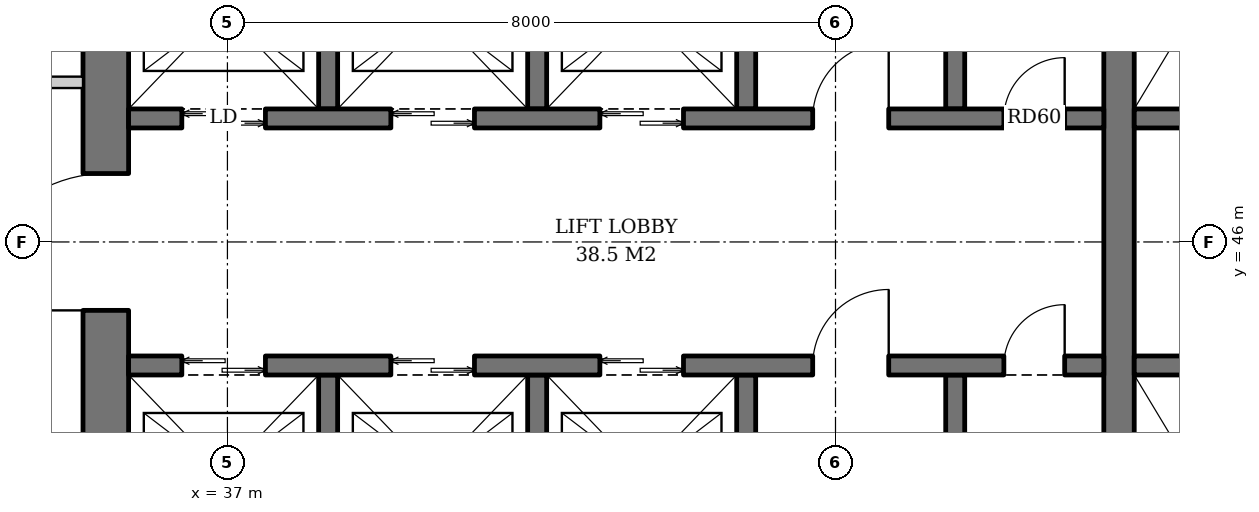
"""IFC4 building model, lengths in metres.
Left out: names, types, materials, properties, quantities, classifications, styles, units other than length and angle.
Written with IfcOpenShell. Run it as: python <this file> out.ifc"""

import sys

from ifc_helpers import new_model, si_unit, direction, frame, frame_2d, origin, place, context, subcontext, project, spatial, rectangle, extrude, element, fill, save


model = new_model("IFC4")
c1 = context("Model", 3, precision=1e-05, world=origin(), true_north=direction((0.0, 1.0)))
c2 = subcontext(c1, "Body", "Model", "MODEL_VIEW")
j1 = project(units=[si_unit("LENGTHUNIT", "METRE"), si_unit("PLANEANGLEUNIT", "RADIAN")], contexts=[c1])
p1 = place(None, origin())
s1 = spatial("IfcSite", under=j1, at=p1, CompositionType="ELEMENT")
p2 = place(p1, origin())
s2 = spatial("IfcBuilding", under=s1, at=p2, CompositionType="ELEMENT")
p3 = place(p2, frame((0.0, 0.0, 173.0)))
s3 = spatial("IfcBuildingStorey", under=s2, at=p3, CompositionType="ELEMENT", Elevation=173.0)
p4 = place(p3, frame((35.4, 36.7, 0.0), z_axis=(0.0, 0.0, 1.0), x_axis=(0.0, 1.0, 0.0)))
e1 = element("IfcWall", 1, at=p4, inside=s3, PredefinedType="SHEAR", context=c2, shape_type="SweptSolid", body=[
    extrude(rectangle(XDim=18.6, YDim=0.6, at=frame_2d((9.3, 0.0))), origin(), (0.0, 0.0, 1.0), 3.8),
])
p5 = place(p4, frame((8.4, 0.0, 0.0)))
e2 = element("IfcOpeningElement", 2, at=p5, cuts=e1, PredefinedType="OPENING", context=c2, shape_type="SweptSolid", body=[
    extrude(rectangle(XDim=1.8, YDim=2.4, at=frame_2d((0.9, 1.2))), frame((0.0, 0.31, 0.0), z_axis=(0.0, -1.0, 0.0), x_axis=(1.0, 0.0, 0.0)), (0.0, 0.0, 1.0), 0.62),
])
p6 = place(p3, frame((48.73, 40.0, 0.0), z_axis=(0.0, 0.0, 1.0), x_axis=(0.0, 1.0, 0.0)))
e3 = element("IfcWall", 3, at=p6, inside=s3, PredefinedType="SHEAR", context=c2, shape_type="SweptSolid", body=[
    extrude(rectangle(XDim=12.0, YDim=0.4, at=frame_2d((6.0, 0.0))), origin(), (0.0, 0.0, 1.0), 3.8),
])
for number, where, z_axis, x_axis in (
    (4, (38.325, 47.75, 0.0), (0.0, 0.0, 1.0), (0.0, 1.0, 0.0)),
    (5, (41.075, 47.75, 0.0), (0.0, 0.0, 1.0), (0.0, 1.0, 0.0)),
    (6, (43.825, 47.75, 0.0), (0.0, 0.0, 1.0), (0.0, 1.0, 0.0)),
    (7, (46.575, 47.75, 0.0), (0.0, 0.0, 1.0), (0.0, 1.0, 0.0)),
):
    element("IfcWall", number, at=place(p3, frame(where, z_axis=z_axis, x_axis=x_axis)), inside=s3, PredefinedType="SHEAR", context=c2, shape_type="SweptSolid", body=[
        extrude(rectangle(XDim=2.6, YDim=0.25, at=frame_2d((1.3, 0.0))), origin(), (0.0, 0.0, 1.0), 3.8),
    ])
p7 = place(p3, frame((35.7, 47.625, 0.0), z_axis=(0.0, 0.0, 1.0), x_axis=(1.0, 0.0, 0.0)))
e8 = element("IfcWall", 8, at=p7, inside=s3, PredefinedType="SHEAR", context=c2, shape_type="SweptSolid", body=[
    extrude(rectangle(XDim=12.83, YDim=0.25, at=frame_2d((6.415, 0.0))), origin(), (0.0, 0.0, 1.0), 3.8),
])
p8 = place(p7, frame((0.7, 0.0, 0.0)))
e9 = element("IfcOpeningElement", 9, at=p8, cuts=e8, PredefinedType="OPENING", context=c2, shape_type="SweptSolid", body=[
    extrude(rectangle(XDim=1.1, YDim=2.2, at=frame_2d((0.55, 1.1))), frame((0.0, 0.135, 0.0), z_axis=(0.0, -1.0, 0.0), x_axis=(1.0, 0.0, 0.0)), (0.0, 0.0, 1.0), 0.27),
])
p9 = place(p7, frame((3.45, 0.0, 0.0)))
e10 = element("IfcOpeningElement", 10, at=p9, cuts=e8, PredefinedType="OPENING", context=c2, shape_type="SweptSolid", body=[
    extrude(rectangle(XDim=1.1, YDim=2.2, at=frame_2d((0.55, 1.1))), frame((0.0, 0.135, 0.0), z_axis=(0.0, -1.0, 0.0), x_axis=(1.0, 0.0, 0.0)), (0.0, 0.0, 1.0), 0.27),
])
p10 = place(p7, frame((6.2, 0.0, 0.0)))
e11 = element("IfcOpeningElement", 11, at=p10, cuts=e8, PredefinedType="OPENING", context=c2, shape_type="SweptSolid", body=[
    extrude(rectangle(XDim=1.1, YDim=2.2, at=frame_2d((0.55, 1.1))), frame((0.0, 0.135, 0.0), z_axis=(0.0, -1.0, 0.0), x_axis=(1.0, 0.0, 0.0)), (0.0, 0.0, 1.0), 0.27),
])
p11 = place(p7, frame((9.0, 0.0, 0.0)))
e12 = element("IfcOpeningElement", 12, at=p11, cuts=e8, PredefinedType="OPENING", context=c2, shape_type="SweptSolid", body=[
    extrude(rectangle(XDim=1.0, YDim=2.1, at=frame_2d((0.5, 1.05))), frame((0.0, 0.135, 0.0), z_axis=(0.0, -1.0, 0.0), x_axis=(1.0, 0.0, 0.0)), (0.0, 0.0, 1.0), 0.27),
])
p12 = place(p7, frame((11.515, 0.0, 0.0)))
e13 = element("IfcOpeningElement", 13, at=p12, cuts=e8, PredefinedType="OPENING", context=c2, shape_type="SweptSolid", body=[
    extrude(rectangle(XDim=0.8, YDim=2.0, at=frame_2d((0.4, 1.0))), frame((0.0, 0.135, 0.0), z_axis=(0.0, -1.0, 0.0), x_axis=(1.0, 0.0, 0.0)), (0.0, 0.0, 1.0), 0.27),
])
for number, where, z_axis, x_axis in (
    (14, (38.325, 44.25, 0.0), (0.0, 0.0, 1.0), (0.0, -1.0, 0.0)),
    (15, (41.075, 44.25, 0.0), (0.0, 0.0, 1.0), (0.0, -1.0, 0.0)),
    (16, (43.825, 44.25, 0.0), (0.0, 0.0, 1.0), (0.0, -1.0, 0.0)),
    (17, (46.575, 44.25, 0.0), (0.0, 0.0, 1.0), (0.0, -1.0, 0.0)),
):
    element("IfcWall", number, at=place(p3, frame(where, z_axis=z_axis, x_axis=x_axis)), inside=s3, PredefinedType="SHEAR", context=c2, shape_type="SweptSolid", body=[
        extrude(rectangle(XDim=2.6, YDim=0.25, at=frame_2d((1.3, 0.0))), origin(), (0.0, 0.0, 1.0), 3.8),
    ])
p13 = place(p3, frame((35.7, 44.375, 0.0), z_axis=(0.0, 0.0, 1.0), x_axis=(1.0, 0.0, 0.0)))
e18 = element("IfcWall", 18, at=p13, inside=s3, PredefinedType="SHEAR", context=c2, shape_type="SweptSolid", body=[
    extrude(rectangle(XDim=12.83, YDim=0.25, at=frame_2d((6.415, 0.0))), origin(), (0.0, 0.0, 1.0), 3.8),
])
p14 = place(p13, frame((0.7, 0.0, 0.0)))
e19 = element("IfcOpeningElement", 19, at=p14, cuts=e18, PredefinedType="OPENING", context=c2, shape_type="SweptSolid", body=[
    extrude(rectangle(XDim=1.1, YDim=2.2, at=frame_2d((0.55, 1.1))), frame((0.0, 0.135, 0.0), z_axis=(0.0, -1.0, 0.0), x_axis=(1.0, 0.0, 0.0)), (0.0, 0.0, 1.0), 0.27),
])
p15 = place(p13, frame((3.45, 0.0, 0.0)))
e20 = element("IfcOpeningElement", 20, at=p15, cuts=e18, PredefinedType="OPENING", context=c2, shape_type="SweptSolid", body=[
    extrude(rectangle(XDim=1.1, YDim=2.2, at=frame_2d((0.55, 1.1))), frame((0.0, 0.135, 0.0), z_axis=(0.0, -1.0, 0.0), x_axis=(1.0, 0.0, 0.0)), (0.0, 0.0, 1.0), 0.27),
])
p16 = place(p13, frame((6.2, 0.0, 0.0)))
e21 = element("IfcOpeningElement", 21, at=p16, cuts=e18, PredefinedType="OPENING", context=c2, shape_type="SweptSolid", body=[
    extrude(rectangle(XDim=1.1, YDim=2.2, at=frame_2d((0.55, 1.1))), frame((0.0, 0.135, 0.0), z_axis=(0.0, -1.0, 0.0), x_axis=(1.0, 0.0, 0.0)), (0.0, 0.0, 1.0), 0.27),
])
p17 = place(p13, frame((9.0, 0.0, 0.0)))
e22 = element("IfcOpeningElement", 22, at=p17, cuts=e18, PredefinedType="OPENING", context=c2, shape_type="SweptSolid", body=[
    extrude(rectangle(XDim=1.0, YDim=2.1, at=frame_2d((0.5, 1.05))), frame((0.0, 0.135, 0.0), z_axis=(0.0, -1.0, 0.0), x_axis=(1.0, 0.0, 0.0)), (0.0, 0.0, 1.0), 0.27),
])
p18 = place(p13, frame((11.515, 0.0, 0.0)))
e23 = element("IfcOpeningElement", 23, at=p18, cuts=e18, PredefinedType="OPENING", context=c2, shape_type="SweptSolid", body=[
    extrude(rectangle(XDim=0.8, YDim=2.0, at=frame_2d((0.4, 1.0))), frame((0.0, 0.135, 0.0), z_axis=(0.0, -1.0, 0.0), x_axis=(1.0, 0.0, 0.0)), (0.0, 0.0, 1.0), 0.27),
])
for number, where, z_axis, x_axis in (
    (24, (48.93, 47.625, 0.0), (0.0, 0.0, 1.0), (1.0, 0.0, 0.0)),
    (25, (48.93, 44.375, 0.0), (0.0, 0.0, 1.0), (1.0, 0.0, 0.0)),
):
    element("IfcWall", number, at=place(p3, frame(where, z_axis=z_axis, x_axis=x_axis)), inside=s3, PredefinedType="SHEAR", context=c2, shape_type="SweptSolid", body=[
        extrude(rectangle(XDim=5.37, YDim=0.25, at=frame_2d((2.685, 0.0))), origin(), (0.0, 0.0, 1.0), 3.8),
    ])
p19 = place(p3, frame((35.1, 48.1, 0.0), z_axis=(0.0, 0.0, 1.0), x_axis=(-1.0, 0.0, 0.0)))
e26 = element("IfcWall", 26, at=p19, inside=s3, PredefinedType="PARTITIONING", context=c2, shape_type="SweptSolid", body=[
    extrude(rectangle(XDim=2.325, YDim=0.15, at=frame_2d((1.163, 0.0))), origin(), (0.0, 0.0, 1.0), 3.62),
])
p20 = place(p8, origin())
e27 = element("IfcDoor", 27, at=p20, inside=s3, OperationType="DOUBLE_DOOR_SLIDING", PredefinedType="DOOR", context=c2, shape_type="SweptSolid", body=[
    extrude(rectangle(XDim=1.1, YDim=2.2, at=frame_2d((0.55, 1.1))), frame((0.0, 0.025, 0.0), z_axis=(0.0, -1.0, 0.0), x_axis=(1.0, 0.0, 0.0)), (0.0, 0.0, 1.0), 0.05),
])
fill(e9, e27)
p21 = place(p9, origin())
e28 = element("IfcDoor", 28, at=p21, inside=s3, OperationType="DOUBLE_DOOR_SLIDING", PredefinedType="DOOR", context=c2, shape_type="SweptSolid", body=[
    extrude(rectangle(XDim=1.1, YDim=2.2, at=frame_2d((0.55, 1.1))), frame((0.0, 0.025, 0.0), z_axis=(0.0, -1.0, 0.0), x_axis=(1.0, 0.0, 0.0)), (0.0, 0.0, 1.0), 0.05),
])
fill(e10, e28)
p22 = place(p10, origin())
e29 = element("IfcDoor", 29, at=p22, inside=s3, OperationType="DOUBLE_DOOR_SLIDING", PredefinedType="DOOR", context=c2, shape_type="SweptSolid", body=[
    extrude(rectangle(XDim=1.1, YDim=2.2, at=frame_2d((0.55, 1.1))), frame((0.0, 0.025, 0.0), z_axis=(0.0, -1.0, 0.0), x_axis=(1.0, 0.0, 0.0)), (0.0, 0.0, 1.0), 0.05),
])
fill(e11, e29)
p23 = place(p11, origin())
e30 = element("IfcDoor", 30, at=p23, inside=s3, OperationType="SINGLE_SWING_RIGHT", PredefinedType="DOOR", context=c2, shape_type="SweptSolid", body=[
    extrude(rectangle(XDim=1.0, YDim=2.1, at=frame_2d((0.5, 1.05))), frame((0.0, 0.025, 0.0), z_axis=(0.0, -1.0, 0.0), x_axis=(1.0, 0.0, 0.0)), (0.0, 0.0, 1.0), 0.05),
])
fill(e12, e30)
p24 = place(p12, origin())
e31 = element("IfcDoor", 31, at=p24, inside=s3, OperationType="SINGLE_SWING_RIGHT", PredefinedType="DOOR", context=c2, shape_type="SweptSolid", body=[
    extrude(rectangle(XDim=0.8, YDim=2.0, at=frame_2d((0.4, 1.0))), frame((0.0, 0.025, 0.0), z_axis=(0.0, -1.0, 0.0), x_axis=(1.0, 0.0, 0.0)), (0.0, 0.0, 1.0), 0.05),
])
fill(e13, e31)
p25 = place(p14, origin())
e32 = element("IfcDoor", 32, at=p25, inside=s3, OperationType="DOUBLE_DOOR_SLIDING", PredefinedType="DOOR", context=c2, shape_type="SweptSolid", body=[
    extrude(rectangle(XDim=1.1, YDim=2.2, at=frame_2d((0.55, 1.1))), frame((0.0, 0.025, 0.0), z_axis=(0.0, -1.0, 0.0), x_axis=(1.0, 0.0, 0.0)), (0.0, 0.0, 1.0), 0.05),
])
fill(e19, e32)
p26 = place(p15, origin())
e33 = element("IfcDoor", 33, at=p26, inside=s3, OperationType="DOUBLE_DOOR_SLIDING", PredefinedType="DOOR", context=c2, shape_type="SweptSolid", body=[
    extrude(rectangle(XDim=1.1, YDim=2.2, at=frame_2d((0.55, 1.1))), frame((0.0, 0.025, 0.0), z_axis=(0.0, -1.0, 0.0), x_axis=(1.0, 0.0, 0.0)), (0.0, 0.0, 1.0), 0.05),
])
fill(e20, e33)
p27 = place(p16, origin())
e34 = element("IfcDoor", 34, at=p27, inside=s3, OperationType="DOUBLE_DOOR_SLIDING", PredefinedType="DOOR", context=c2, shape_type="SweptSolid", body=[
    extrude(rectangle(XDim=1.1, YDim=2.2, at=frame_2d((0.55, 1.1))), frame((0.0, 0.025, 0.0), z_axis=(0.0, -1.0, 0.0), x_axis=(1.0, 0.0, 0.0)), (0.0, 0.0, 1.0), 0.05),
])
fill(e21, e34)
p28 = place(p17, origin())
e35 = element("IfcDoor", 35, at=p28, inside=s3, OperationType="SINGLE_SWING_RIGHT", PredefinedType="DOOR", context=c2, shape_type="SweptSolid", body=[
    extrude(rectangle(XDim=1.0, YDim=2.1, at=frame_2d((0.5, 1.05))), frame((0.0, 0.025, 0.0), z_axis=(0.0, -1.0, 0.0), x_axis=(1.0, 0.0, 0.0)), (0.0, 0.0, 1.0), 0.05),
])
fill(e22, e35)
p29 = place(p18, origin())
e36 = element("IfcDoor", 36, at=p29, inside=s3, OperationType="SINGLE_SWING_RIGHT", PredefinedType="DOOR", context=c2, shape_type="SweptSolid", body=[
    extrude(rectangle(XDim=0.8, YDim=2.0, at=frame_2d((0.4, 1.0))), frame((0.0, 0.025, 0.0), z_axis=(0.0, -1.0, 0.0), x_axis=(1.0, 0.0, 0.0)), (0.0, 0.0, 1.0), 0.05),
])
fill(e23, e36)
p30 = place(p5, origin())
e37 = element("IfcDoor", 37, at=p30, inside=s3, OperationType="DOUBLE_DOOR_SINGLE_SWING", PredefinedType="DOOR", context=c2, shape_type="SweptSolid", body=[
    extrude(rectangle(XDim=1.8, YDim=2.4, at=frame_2d((0.9, 1.2))), frame((0.0, 0.025, 0.0), z_axis=(0.0, -1.0, 0.0), x_axis=(1.0, 0.0, 0.0)), (0.0, 0.0, 1.0), 0.05),
])
fill(e2, e37)
save(model, sys.argv[1])
